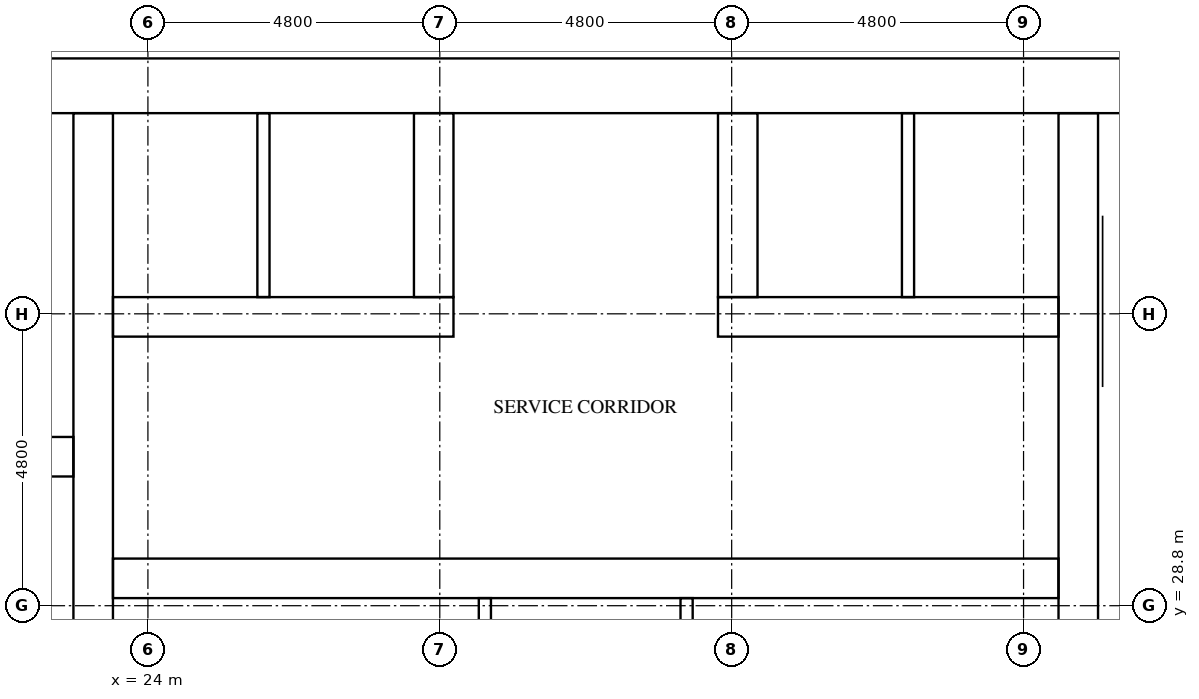
"""IFC4 building model, lengths in metres.
Left out: names, types, materials, properties, quantities, classifications, styles, units other than length and angle.
Written with IfcOpenShell. Run it as: python <this file> out.ifc"""

import sys

from ifc_helpers import new_model, si_unit, direction, frame, frame_2d, origin, place, context, subcontext, project, spatial, rectangle, extrude, element, fill, save


model = new_model("IFC4")
c1 = context("Model", 3, precision=1e-05, world=origin(), true_north=direction((0.0, 1.0)))
c2 = subcontext(c1, "Body", "Model", "MODEL_VIEW")
j1 = project(units=[si_unit("LENGTHUNIT", "METRE"), si_unit("PLANEANGLEUNIT", "RADIAN")], contexts=[c1])
p1 = place(None, origin())
s1 = spatial("IfcSite", under=j1, at=p1, CompositionType="ELEMENT")
p2 = place(p1, origin())
s2 = spatial("IfcBuilding", under=s1, at=p2, CompositionType="ELEMENT")
p3 = place(p2, frame((0.0, 0.0, 66.3)))
s3 = spatial("IfcBuildingStorey", under=s2, at=p3, CompositionType="ELEMENT", Elevation=66.3)
p4 = place(p3, frame((15.0, 37.35, 0.0), z_axis=(0.0, 0.0, 1.0), x_axis=(1.0, 0.0, 0.0)))
e1 = element("IfcWall", 1, at=p4, inside=s3, PredefinedType="SHEAR", context=c2, shape_type="SweptSolid", body=[
    extrude(rectangle(XDim=32.4, YDim=0.9, at=frame_2d((16.2, 0.0))), origin(), (0.0, 0.0, 1.0), 3.2),
])
p5 = place(p4, frame((15.3, 0.0, 0.0)))
e2 = element("IfcOpeningElement", 2, at=p5, cuts=e1, PredefinedType="OPENING", context=c2, shape_type="SweptSolid", body=[
    extrude(rectangle(XDim=1.8, YDim=2.1, at=frame_2d((0.9, 1.05))), frame((0.0, 0.46, 0.0), z_axis=(0.0, -1.0, 0.0), x_axis=(1.0, 0.0, 0.0)), (0.0, 0.0, 1.0), 0.92),
])
p6 = place(p4, frame((1.794, 0.0, 0.0)))
e3 = element("IfcOpeningElement", 3, at=p6, cuts=e1, PredefinedType="OPENING", context=c2, shape_type="SweptSolid", body=[
    extrude(rectangle(XDim=1.0, YDim=2.1, at=frame_2d((0.5, 1.05))), frame((0.0, 0.46, 0.0), z_axis=(0.0, -1.0, 0.0), x_axis=(1.0, 0.0, 0.0)), (0.0, 0.0, 1.0), 0.92),
])
p7 = place(p4, frame((5.331, 0.0, 0.0)))
e4 = element("IfcOpeningElement", 4, at=p7, cuts=e1, PredefinedType="OPENING", context=c2, shape_type="SweptSolid", body=[
    extrude(rectangle(XDim=1.0, YDim=2.1, at=frame_2d((0.5, 1.05))), frame((0.0, 0.46, 0.0), z_axis=(0.0, -1.0, 0.0), x_axis=(1.0, 0.0, 0.0)), (0.0, 0.0, 1.0), 0.92),
])
p8 = place(p3, frame((23.1, 15.9, 0.0), z_axis=(0.0, 0.0, 1.0), x_axis=(0.0, 1.0, 0.0)))
e5 = element("IfcWall", 5, at=p8, inside=s3, PredefinedType="SHEAR", context=c2, shape_type="SweptSolid", body=[
    extrude(rectangle(XDim=21.0, YDim=0.65, at=frame_2d((10.5, 0.0))), origin(), (0.0, 0.0, 1.0), 3.2),
])
p9 = place(p3, frame((39.3, 27.75, 0.0), z_axis=(0.0, 0.0, 1.0), x_axis=(0.0, 1.0, 0.0)))
e6 = element("IfcWall", 6, at=p9, inside=s3, PredefinedType="SHEAR", context=c2, shape_type="SweptSolid", body=[
    extrude(rectangle(XDim=9.15, YDim=0.65, at=frame_2d((4.575, 0.0))), origin(), (0.0, 0.0, 1.0), 3.2),
])
p10 = place(p3, frame((15.9, 31.25, 0.0), z_axis=(0.0, 0.0, 1.0), x_axis=(1.0, 0.0, 0.0)))
e7 = element("IfcWall", 7, at=p10, inside=s3, PredefinedType="SHEAR", context=c2, shape_type="SweptSolid", body=[
    extrude(rectangle(XDim=6.875, YDim=0.65, at=frame_2d((3.438, 0.0))), origin(), (0.0, 0.0, 1.0), 3.2),
])
p11 = place(p3, frame((23.425, 29.25, 0.0), z_axis=(0.0, 0.0, 1.0), x_axis=(1.0, 0.0, 0.0)))
e8 = element("IfcWall", 8, at=p11, inside=s3, PredefinedType="SHEAR", context=c2, shape_type="SweptSolid", body=[
    extrude(rectangle(XDim=15.55, YDim=0.65, at=frame_2d((7.775, 0.0))), origin(), (0.0, 0.0, 1.0), 3.2),
])
p12 = place(p11, frame((2.508, 0.0, 0.0)))
e9 = element("IfcOpeningElement", 9, at=p12, cuts=e8, PredefinedType="OPENING", context=c2, shape_type="SweptSolid", body=[
    extrude(rectangle(XDim=1.0, YDim=2.1, at=frame_2d((0.5, 1.05))), frame((0.0, 0.335, 0.0), z_axis=(0.0, -1.0, 0.0), x_axis=(1.0, 0.0, 0.0)), (0.0, 0.0, 1.0), 0.67),
])
p13 = place(p11, frame((7.275, 0.0, 0.0)))
e10 = element("IfcOpeningElement", 10, at=p13, cuts=e8, PredefinedType="OPENING", context=c2, shape_type="SweptSolid", body=[
    extrude(rectangle(XDim=1.0, YDim=2.1, at=frame_2d((0.5, 1.05))), frame((0.0, 0.335, 0.0), z_axis=(0.0, -1.0, 0.0), x_axis=(1.0, 0.0, 0.0)), (0.0, 0.0, 1.0), 0.67),
])
p14 = place(p11, frame((12.042, 0.0, 0.0)))
e11 = element("IfcOpeningElement", 11, at=p14, cuts=e8, PredefinedType="OPENING", context=c2, shape_type="SweptSolid", body=[
    extrude(rectangle(XDim=1.0, YDim=2.1, at=frame_2d((0.5, 1.05))), frame((0.0, 0.335, 0.0), z_axis=(0.0, -1.0, 0.0), x_axis=(1.0, 0.0, 0.0)), (0.0, 0.0, 1.0), 0.67),
])
p15 = place(p3, frame((23.425, 33.55, 0.0), z_axis=(0.0, 0.0, 1.0), x_axis=(1.0, 0.0, 0.0)))
e12 = element("IfcWall", 12, at=p15, inside=s3, PredefinedType="SHEAR", context=c2, shape_type="SweptSolid", body=[
    extrude(rectangle(XDim=5.6, YDim=0.65, at=frame_2d((2.8, 0.0))), origin(), (0.0, 0.0, 1.0), 3.2),
])
p16 = place(p3, frame((33.375, 33.55, 0.0), z_axis=(0.0, 0.0, 1.0), x_axis=(1.0, 0.0, 0.0)))
e13 = element("IfcWall", 13, at=p16, inside=s3, PredefinedType="SHEAR", context=c2, shape_type="SweptSolid", body=[
    extrude(rectangle(XDim=5.6, YDim=0.65, at=frame_2d((2.8, 0.0))), origin(), (0.0, 0.0, 1.0), 3.2),
])
for number, where, z_axis, x_axis in (
    (14, (28.7, 33.875, 0.0), (0.0, 0.0, 1.0), (0.0, 1.0, 0.0)),
    (15, (33.7, 33.875, 0.0), (0.0, 0.0, 1.0), (0.0, 1.0, 0.0)),
):
    element("IfcWall", number, at=place(p3, frame(where, z_axis=z_axis, x_axis=x_axis)), inside=s3, PredefinedType="SHEAR", context=c2, shape_type="SweptSolid", body=[
        extrude(rectangle(XDim=3.025, YDim=0.65, at=frame_2d((1.512, 0.0))), origin(), (0.0, 0.0, 1.0), 3.2),
    ])
for number, where, z_axis, x_axis in (
    (16, (25.9, 33.875, 0.0), (0.0, 0.0, 1.0), (0.0, 1.0, 0.0)),
    (17, (36.5, 33.875, 0.0), (0.0, 0.0, 1.0), (0.0, 1.0, 0.0)),
):
    element("IfcWall", number, at=place(p3, frame(where, z_axis=z_axis, x_axis=x_axis)), inside=s3, PredefinedType="SOLIDWALL", context=c2, shape_type="SweptSolid", body=[
        extrude(rectangle(XDim=3.025, YDim=0.2, at=frame_2d((1.512, 0.0))), origin(), (0.0, 0.0, 1.0), 3.2),
    ])
for number, where, z_axis, x_axis in (
    (18, (29.541, 26.475, 0.0), (0.0, 0.0, 1.0), (0.0, 1.0, 0.0)),
    (19, (32.859, 26.475, 0.0), (0.0, 0.0, 1.0), (0.0, 1.0, 0.0)),
):
    element("IfcWall", number, at=place(p3, frame(where, z_axis=z_axis, x_axis=x_axis)), inside=s3, PredefinedType="PARTITIONING", context=c2, shape_type="SweptSolid", body=[
        extrude(rectangle(XDim=2.45, YDim=0.2, at=frame_2d((1.225, 0.0))), origin(), (0.0, 0.0, 1.0), 3.2),
    ])
p17 = place(p5, origin())
e20 = element("IfcDoor", 20, at=p17, inside=s3, OperationType="DOUBLE_DOOR_SINGLE_SWING", PredefinedType="DOOR", context=c2, shape_type="SweptSolid", body=[
    extrude(rectangle(XDim=1.8, YDim=2.1, at=frame_2d((0.9, 1.05))), frame((0.0, 0.025, 0.0), z_axis=(0.0, -1.0, 0.0), x_axis=(1.0, 0.0, 0.0)), (0.0, 0.0, 1.0), 0.05),
])
fill(e2, e20)
p18 = place(p12, origin())
e21 = element("IfcDoor", 21, at=p18, inside=s3, OperationType="SINGLE_SWING_LEFT", PredefinedType="DOOR", context=c2, shape_type="SweptSolid", body=[
    extrude(rectangle(XDim=1.0, YDim=2.1, at=frame_2d((0.5, 1.05))), frame((0.0, 0.025, 0.0), z_axis=(0.0, -1.0, 0.0), x_axis=(1.0, 0.0, 0.0)), (0.0, 0.0, 1.0), 0.05),
])
fill(e9, e21)
p19 = place(p13, origin())
e22 = element("IfcDoor", 22, at=p19, inside=s3, OperationType="SINGLE_SWING_RIGHT", PredefinedType="DOOR", context=c2, shape_type="SweptSolid", body=[
    extrude(rectangle(XDim=1.0, YDim=2.1, at=frame_2d((0.5, 1.05))), frame((0.0, 0.025, 0.0), z_axis=(0.0, -1.0, 0.0), x_axis=(1.0, 0.0, 0.0)), (0.0, 0.0, 1.0), 0.05),
])
fill(e10, e22)
p20 = place(p14, origin())
e23 = element("IfcDoor", 23, at=p20, inside=s3, OperationType="SINGLE_SWING_LEFT", PredefinedType="DOOR", context=c2, shape_type="SweptSolid", body=[
    extrude(rectangle(XDim=1.0, YDim=2.1, at=frame_2d((0.5, 1.05))), frame((0.0, 0.025, 0.0), z_axis=(0.0, -1.0, 0.0), x_axis=(1.0, 0.0, 0.0)), (0.0, 0.0, 1.0), 0.05),
])
fill(e11, e23)
save(model, sys.argv[1])
